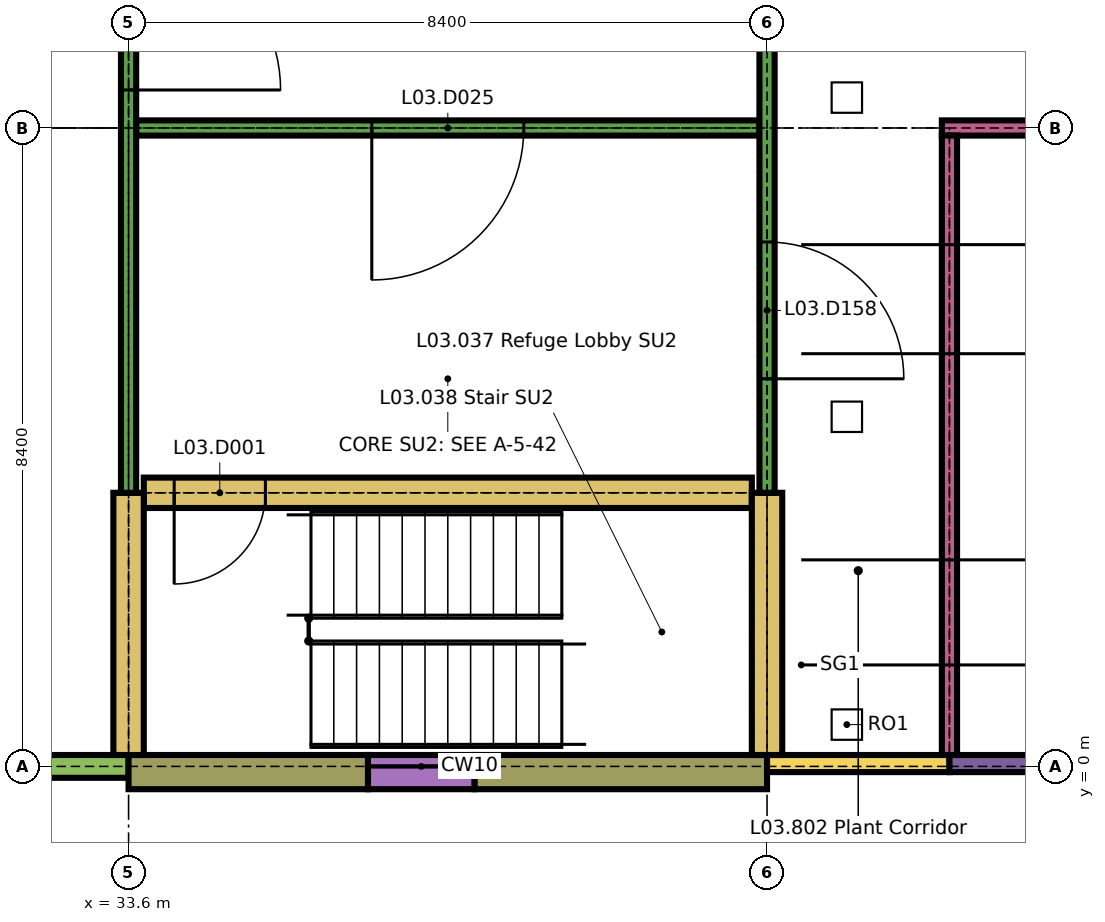
"""IFC4 building model, lengths in metres.
Left out: names, types, materials, properties, quantities, classifications, styles, units other than length and angle.
Written with IfcOpenShell. Run it as: python <this file> out.ifc"""

import sys

from ifc_helpers import new_model, si_unit, direction, frame, frame_2d, origin, place, context, subcontext, project, spatial, rectangle, extrude, element, fill, save


model = new_model("IFC4")
c1 = context("Model", 3, precision=1e-05, world=origin(), true_north=direction((0.0, 1.0)))
c2 = subcontext(c1, "Body", "Model", "MODEL_VIEW")
j1 = project(units=[si_unit("LENGTHUNIT", "METRE"), si_unit("PLANEANGLEUNIT", "RADIAN")], contexts=[c1])
p1 = place(None, origin())
s1 = spatial("IfcSite", under=j1, at=p1, CompositionType="ELEMENT")
p2 = place(p1, origin())
s2 = spatial("IfcBuilding", under=s1, at=p2, CompositionType="ELEMENT")
p3 = place(p2, frame((0.0, 0.0, 15.3)))
s3 = spatial("IfcBuildingStorey", under=s2, at=p3, CompositionType="ELEMENT", Elevation=15.3)
p4 = place(p3, frame((32.3, 0.0, 0.0), z_axis=(0.0, 0.0, 1.0), x_axis=(1.0, 0.0, 0.0)))
e1 = element("IfcWall", 1, at=p4, inside=s3, PredefinedType="SOLIDWALL", context=c2, shape_type="SweptSolid", body=[
    extrude(rectangle(XDim=1.3, YDim=0.3, at=frame_2d((0.65, 0.0))), origin(), (0.0, 0.0, 1.0), 2.96),
])
p5 = place(p3, frame((33.6, -0.075, 0.0), z_axis=(0.0, 0.0, 1.0), x_axis=(1.0, 0.0, 0.0)))
e2 = element("IfcWall", 2, at=p5, inside=s3, PredefinedType="SOLIDWALL", context=c2, shape_type="SweptSolid", body=[
    extrude(rectangle(XDim=3.15, YDim=0.45, at=frame_2d((1.575, 0.0))), origin(), (0.0, 0.0, 1.0), 3.26),
])
p6 = place(p3, frame((38.15, -0.075, 0.0), z_axis=(0.0, 0.0, 1.0), x_axis=(1.0, 0.0, 0.0)))
e3 = element("IfcWall", 3, at=p6, inside=s3, PredefinedType="SOLIDWALL", context=c2, shape_type="SweptSolid", body=[
    extrude(rectangle(XDim=3.85, YDim=0.45, at=frame_2d((1.925, 0.0))), origin(), (0.0, 0.0, 1.0), 3.26),
])
p7 = place(p3, frame((36.75, -0.075, 0.0), z_axis=(0.0, 0.0, 1.0), x_axis=(1.0, 0.0, 0.0)))
e4 = element("IfcWall", 4, at=p7, inside=s3, PredefinedType="SOLIDWALL", context=c2, shape_type="SweptSolid", body=[
    extrude(rectangle(XDim=1.4, YDim=0.45, at=frame_2d((0.7, 0.0))), origin(), (0.0, 0.0, 1.0), 0.6),
])
p8 = place(p3, frame((42.0, 0.038, 0.0), z_axis=(0.0, 0.0, 1.0), x_axis=(1.0, 0.0, 0.0)))
e5 = element("IfcWall", 5, at=p8, inside=s3, PredefinedType="SOLIDWALL", context=c2, shape_type="SweptSolid", body=[
    extrude(rectangle(XDim=2.4, YDim=0.225, at=frame_2d((1.2, 0.0))), origin(), (0.0, 0.0, 1.0), 3.26),
])
p9 = place(p3, frame((44.4, 0.038, 0.0), z_axis=(0.0, 0.0, 1.0), x_axis=(1.0, 0.0, 0.0)))
e6 = element("IfcWall", 6, at=p9, inside=s3, PredefinedType="SOLIDWALL", context=c2, shape_type="SweptSolid", body=[
    extrude(rectangle(XDim=5.625, YDim=0.225, at=frame_2d((2.812, 0.0))), origin(), (0.0, 0.0, 1.0), 4.0),
])
p10 = place(p9, frame((2.85, 0.0, 0.6)))
e7 = element("IfcOpeningElement", 7, at=p10, cuts=e6, PredefinedType="OPENING", context=c2, shape_type="SweptSolid", body=[
    extrude(rectangle(XDim=2.1, YDim=2.1, at=frame_2d((1.05, 1.05))), frame((0.0, 0.123, 0.0), z_axis=(0.0, -1.0, 0.0), x_axis=(1.0, 0.0, 0.0)), (0.0, 0.0, 1.0), 0.245),
])
p11 = place(p3, frame((42.21, 4.2, 4.904), z_axis=(0.0, 0.0, 1.0), x_axis=(1.0, 0.0, 0.0)))
e8 = element("IfcWall", 8, at=p11, inside=s3, PredefinedType="SOLIDWALL", context=c2, shape_type="SweptSolid", body=[
    extrude(rectangle(XDim=58.38, YDim=0.2, at=frame_2d((29.19, 0.0))), origin(), (0.0, 0.0, 1.0), 2.539),
])
p12 = place(p11, frame((1.05, 0.0, 0.3)))
e9 = element("IfcOpeningElement", 9, at=p12, cuts=e8, PredefinedType="OPENING", context=c2, shape_type="SweptSolid", body=[
    extrude(rectangle(XDim=2.1, YDim=1.8, at=frame_2d((1.05, 0.9))), frame((0.0, 0.11, 0.0), z_axis=(0.0, -1.0, 0.0), x_axis=(1.0, 0.0, 0.0)), (0.0, 0.0, 1.0), 0.22),
])
p13 = place(p11, frame((5.25, 0.0, 0.3)))
e10 = element("IfcOpeningElement", 10, at=p13, cuts=e8, PredefinedType="OPENING", context=c2, shape_type="SweptSolid", body=[
    extrude(rectangle(XDim=2.1, YDim=1.8, at=frame_2d((1.05, 0.9))), frame((0.0, 0.11, 0.0), z_axis=(0.0, -1.0, 0.0), x_axis=(1.0, 0.0, 0.0)), (0.0, 0.0, 1.0), 0.22),
])
p14 = place(p11, frame((9.45, 0.0, 0.3)))
e11 = element("IfcOpeningElement", 11, at=p14, cuts=e8, PredefinedType="OPENING", context=c2, shape_type="SweptSolid", body=[
    extrude(rectangle(XDim=2.1, YDim=1.8, at=frame_2d((1.05, 0.9))), frame((0.0, 0.11, 0.0), z_axis=(0.0, -1.0, 0.0), x_axis=(1.0, 0.0, 0.0)), (0.0, 0.0, 1.0), 0.22),
])
p15 = place(p11, frame((13.65, 0.0, 0.3)))
e12 = element("IfcOpeningElement", 12, at=p15, cuts=e8, PredefinedType="OPENING", context=c2, shape_type="SweptSolid", body=[
    extrude(rectangle(XDim=2.1, YDim=1.8, at=frame_2d((1.05, 0.9))), frame((0.0, 0.11, 0.0), z_axis=(0.0, -1.0, 0.0), x_axis=(1.0, 0.0, 0.0)), (0.0, 0.0, 1.0), 0.22),
])
p16 = place(p11, frame((17.85, 0.0, 0.3)))
e13 = element("IfcOpeningElement", 13, at=p16, cuts=e8, PredefinedType="OPENING", context=c2, shape_type="SweptSolid", body=[
    extrude(rectangle(XDim=2.1, YDim=1.8, at=frame_2d((1.05, 0.9))), frame((0.0, 0.11, 0.0), z_axis=(0.0, -1.0, 0.0), x_axis=(1.0, 0.0, 0.0)), (0.0, 0.0, 1.0), 0.22),
])
p17 = place(p11, frame((22.05, 0.0, 0.3)))
e14 = element("IfcOpeningElement", 14, at=p17, cuts=e8, PredefinedType="OPENING", context=c2, shape_type="SweptSolid", body=[
    extrude(rectangle(XDim=2.1, YDim=1.8, at=frame_2d((1.05, 0.9))), frame((0.0, 0.11, 0.0), z_axis=(0.0, -1.0, 0.0), x_axis=(1.0, 0.0, 0.0)), (0.0, 0.0, 1.0), 0.22),
])
p18 = place(p11, frame((26.25, 0.0, 0.3)))
e15 = element("IfcOpeningElement", 15, at=p18, cuts=e8, PredefinedType="OPENING", context=c2, shape_type="SweptSolid", body=[
    extrude(rectangle(XDim=2.1, YDim=1.8, at=frame_2d((1.05, 0.9))), frame((0.0, 0.11, 0.0), z_axis=(0.0, -1.0, 0.0), x_axis=(1.0, 0.0, 0.0)), (0.0, 0.0, 1.0), 0.22),
])
p19 = place(p11, frame((30.45, 0.0, 0.3)))
e16 = element("IfcOpeningElement", 16, at=p19, cuts=e8, PredefinedType="OPENING", context=c2, shape_type="SweptSolid", body=[
    extrude(rectangle(XDim=2.1, YDim=1.8, at=frame_2d((1.05, 0.9))), frame((0.0, 0.11, 0.0), z_axis=(0.0, -1.0, 0.0), x_axis=(1.0, 0.0, 0.0)), (0.0, 0.0, 1.0), 0.22),
])
p20 = place(p11, frame((34.65, 0.0, 0.3)))
e17 = element("IfcOpeningElement", 17, at=p20, cuts=e8, PredefinedType="OPENING", context=c2, shape_type="SweptSolid", body=[
    extrude(rectangle(XDim=2.1, YDim=1.8, at=frame_2d((1.05, 0.9))), frame((0.0, 0.11, 0.0), z_axis=(0.0, -1.0, 0.0), x_axis=(1.0, 0.0, 0.0)), (0.0, 0.0, 1.0), 0.22),
])
p21 = place(p11, frame((38.85, 0.0, 0.3)))
e18 = element("IfcOpeningElement", 18, at=p21, cuts=e8, PredefinedType="OPENING", context=c2, shape_type="SweptSolid", body=[
    extrude(rectangle(XDim=2.1, YDim=1.8, at=frame_2d((1.05, 0.9))), frame((0.0, 0.11, 0.0), z_axis=(0.0, -1.0, 0.0), x_axis=(1.0, 0.0, 0.0)), (0.0, 0.0, 1.0), 0.22),
])
p22 = place(p11, frame((43.05, 0.0, 0.3)))
e19 = element("IfcOpeningElement", 19, at=p22, cuts=e8, PredefinedType="OPENING", context=c2, shape_type="SweptSolid", body=[
    extrude(rectangle(XDim=2.1, YDim=1.8, at=frame_2d((1.05, 0.9))), frame((0.0, 0.11, 0.0), z_axis=(0.0, -1.0, 0.0), x_axis=(1.0, 0.0, 0.0)), (0.0, 0.0, 1.0), 0.22),
])
p23 = place(p11, frame((47.25, 0.0, 0.3)))
e20 = element("IfcOpeningElement", 20, at=p23, cuts=e8, PredefinedType="OPENING", context=c2, shape_type="SweptSolid", body=[
    extrude(rectangle(XDim=2.1, YDim=1.8, at=frame_2d((1.05, 0.9))), frame((0.0, 0.11, 0.0), z_axis=(0.0, -1.0, 0.0), x_axis=(1.0, 0.0, 0.0)), (0.0, 0.0, 1.0), 0.22),
])
p24 = place(p11, frame((51.45, 0.0, 0.3)))
e21 = element("IfcOpeningElement", 21, at=p24, cuts=e8, PredefinedType="OPENING", context=c2, shape_type="SweptSolid", body=[
    extrude(rectangle(XDim=2.1, YDim=1.8, at=frame_2d((1.05, 0.9))), frame((0.0, 0.11, 0.0), z_axis=(0.0, -1.0, 0.0), x_axis=(1.0, 0.0, 0.0)), (0.0, 0.0, 1.0), 0.22),
])
p25 = place(p11, frame((55.65, 0.0, 0.3)))
e22 = element("IfcOpeningElement", 22, at=p25, cuts=e8, PredefinedType="OPENING", context=c2, shape_type="SweptSolid", body=[
    extrude(rectangle(XDim=2.1, YDim=1.8, at=frame_2d((1.05, 0.9))), frame((0.0, 0.11, 0.0), z_axis=(0.0, -1.0, 0.0), x_axis=(1.0, 0.0, 0.0)), (0.0, 0.0, 1.0), 0.22),
])
p26 = place(p3, frame((42.21, 8.4, 4.904), z_axis=(0.0, 0.0, 1.0), x_axis=(1.0, 0.0, 0.0)))
e23 = element("IfcWall", 23, at=p26, inside=s3, PredefinedType="SOLIDWALL", context=c2, shape_type="SweptSolid", body=[
    extrude(rectangle(XDim=58.38, YDim=0.2, at=frame_2d((29.19, 0.0))), origin(), (0.0, 0.0, 1.0), 2.539),
])
p27 = place(p26, frame((1.05, 0.0, 0.3)))
e24 = element("IfcOpeningElement", 24, at=p27, cuts=e23, PredefinedType="OPENING", context=c2, shape_type="SweptSolid", body=[
    extrude(rectangle(XDim=2.1, YDim=1.8, at=frame_2d((1.05, 0.9))), frame((0.0, 0.11, 0.0), z_axis=(0.0, -1.0, 0.0), x_axis=(1.0, 0.0, 0.0)), (0.0, 0.0, 1.0), 0.22),
])
p28 = place(p26, frame((5.25, 0.0, 0.3)))
e25 = element("IfcOpeningElement", 25, at=p28, cuts=e23, PredefinedType="OPENING", context=c2, shape_type="SweptSolid", body=[
    extrude(rectangle(XDim=2.1, YDim=1.8, at=frame_2d((1.05, 0.9))), frame((0.0, 0.11, 0.0), z_axis=(0.0, -1.0, 0.0), x_axis=(1.0, 0.0, 0.0)), (0.0, 0.0, 1.0), 0.22),
])
p29 = place(p26, frame((9.45, 0.0, 0.3)))
e26 = element("IfcOpeningElement", 26, at=p29, cuts=e23, PredefinedType="OPENING", context=c2, shape_type="SweptSolid", body=[
    extrude(rectangle(XDim=2.1, YDim=1.8, at=frame_2d((1.05, 0.9))), frame((0.0, 0.11, 0.0), z_axis=(0.0, -1.0, 0.0), x_axis=(1.0, 0.0, 0.0)), (0.0, 0.0, 1.0), 0.22),
])
p30 = place(p26, frame((13.65, 0.0, 0.3)))
e27 = element("IfcOpeningElement", 27, at=p30, cuts=e23, PredefinedType="OPENING", context=c2, shape_type="SweptSolid", body=[
    extrude(rectangle(XDim=2.1, YDim=1.8, at=frame_2d((1.05, 0.9))), frame((0.0, 0.11, 0.0), z_axis=(0.0, -1.0, 0.0), x_axis=(1.0, 0.0, 0.0)), (0.0, 0.0, 1.0), 0.22),
])
p31 = place(p26, frame((17.85, 0.0, 0.3)))
e28 = element("IfcOpeningElement", 28, at=p31, cuts=e23, PredefinedType="OPENING", context=c2, shape_type="SweptSolid", body=[
    extrude(rectangle(XDim=2.1, YDim=1.8, at=frame_2d((1.05, 0.9))), frame((0.0, 0.11, 0.0), z_axis=(0.0, -1.0, 0.0), x_axis=(1.0, 0.0, 0.0)), (0.0, 0.0, 1.0), 0.22),
])
p32 = place(p26, frame((22.05, 0.0, 0.3)))
e29 = element("IfcOpeningElement", 29, at=p32, cuts=e23, PredefinedType="OPENING", context=c2, shape_type="SweptSolid", body=[
    extrude(rectangle(XDim=2.1, YDim=1.8, at=frame_2d((1.05, 0.9))), frame((0.0, 0.11, 0.0), z_axis=(0.0, -1.0, 0.0), x_axis=(1.0, 0.0, 0.0)), (0.0, 0.0, 1.0), 0.22),
])
p33 = place(p26, frame((26.25, 0.0, 0.3)))
e30 = element("IfcOpeningElement", 30, at=p33, cuts=e23, PredefinedType="OPENING", context=c2, shape_type="SweptSolid", body=[
    extrude(rectangle(XDim=2.1, YDim=1.8, at=frame_2d((1.05, 0.9))), frame((0.0, 0.11, 0.0), z_axis=(0.0, -1.0, 0.0), x_axis=(1.0, 0.0, 0.0)), (0.0, 0.0, 1.0), 0.22),
])
p34 = place(p26, frame((30.45, 0.0, 0.3)))
e31 = element("IfcOpeningElement", 31, at=p34, cuts=e23, PredefinedType="OPENING", context=c2, shape_type="SweptSolid", body=[
    extrude(rectangle(XDim=2.1, YDim=1.8, at=frame_2d((1.05, 0.9))), frame((0.0, 0.11, 0.0), z_axis=(0.0, -1.0, 0.0), x_axis=(1.0, 0.0, 0.0)), (0.0, 0.0, 1.0), 0.22),
])
p35 = place(p26, frame((34.65, 0.0, 0.3)))
e32 = element("IfcOpeningElement", 32, at=p35, cuts=e23, PredefinedType="OPENING", context=c2, shape_type="SweptSolid", body=[
    extrude(rectangle(XDim=2.1, YDim=1.8, at=frame_2d((1.05, 0.9))), frame((0.0, 0.11, 0.0), z_axis=(0.0, -1.0, 0.0), x_axis=(1.0, 0.0, 0.0)), (0.0, 0.0, 1.0), 0.22),
])
p36 = place(p26, frame((38.85, 0.0, 0.3)))
e33 = element("IfcOpeningElement", 33, at=p36, cuts=e23, PredefinedType="OPENING", context=c2, shape_type="SweptSolid", body=[
    extrude(rectangle(XDim=2.1, YDim=1.8, at=frame_2d((1.05, 0.9))), frame((0.0, 0.11, 0.0), z_axis=(0.0, -1.0, 0.0), x_axis=(1.0, 0.0, 0.0)), (0.0, 0.0, 1.0), 0.22),
])
p37 = place(p26, frame((43.05, 0.0, 0.3)))
e34 = element("IfcOpeningElement", 34, at=p37, cuts=e23, PredefinedType="OPENING", context=c2, shape_type="SweptSolid", body=[
    extrude(rectangle(XDim=2.1, YDim=1.8, at=frame_2d((1.05, 0.9))), frame((0.0, 0.11, 0.0), z_axis=(0.0, -1.0, 0.0), x_axis=(1.0, 0.0, 0.0)), (0.0, 0.0, 1.0), 0.22),
])
p38 = place(p26, frame((47.25, 0.0, 0.3)))
e35 = element("IfcOpeningElement", 35, at=p38, cuts=e23, PredefinedType="OPENING", context=c2, shape_type="SweptSolid", body=[
    extrude(rectangle(XDim=2.1, YDim=1.8, at=frame_2d((1.05, 0.9))), frame((0.0, 0.11, 0.0), z_axis=(0.0, -1.0, 0.0), x_axis=(1.0, 0.0, 0.0)), (0.0, 0.0, 1.0), 0.22),
])
p39 = place(p26, frame((51.45, 0.0, 0.3)))
e36 = element("IfcOpeningElement", 36, at=p39, cuts=e23, PredefinedType="OPENING", context=c2, shape_type="SweptSolid", body=[
    extrude(rectangle(XDim=2.1, YDim=1.8, at=frame_2d((1.05, 0.9))), frame((0.0, 0.11, 0.0), z_axis=(0.0, -1.0, 0.0), x_axis=(1.0, 0.0, 0.0)), (0.0, 0.0, 1.0), 0.22),
])
p40 = place(p26, frame((55.65, 0.0, 0.3)))
e37 = element("IfcOpeningElement", 37, at=p40, cuts=e23, PredefinedType="OPENING", context=c2, shape_type="SweptSolid", body=[
    extrude(rectangle(XDim=2.1, YDim=1.8, at=frame_2d((1.05, 0.9))), frame((0.0, 0.11, 0.0), z_axis=(0.0, -1.0, 0.0), x_axis=(1.0, 0.0, 0.0)), (0.0, 0.0, 1.0), 0.22),
])
p41 = place(p3, frame((33.8, 3.6, 0.0), z_axis=(0.0, 0.0, 1.0), x_axis=(1.0, 0.0, 0.0)))
e38 = element("IfcWall", 38, at=p41, inside=s3, PredefinedType="SHEAR", context=c2, shape_type="SweptSolid", body=[
    extrude(rectangle(XDim=8.0, YDim=0.4, at=frame_2d((4.0, 0.0))), origin(), (0.0, 0.0, 1.0), 3.26),
])
p42 = place(p41, frame((0.4, 0.0, 0.0)))
e39 = element("IfcOpeningElement", 39, at=p42, cuts=e38, PredefinedType="OPENING", context=c2, shape_type="SweptSolid", body=[
    extrude(rectangle(XDim=1.2, YDim=2.1, at=frame_2d((0.6, 1.05))), frame((0.0, 0.21, 0.0), z_axis=(0.0, -1.0, 0.0), x_axis=(1.0, 0.0, 0.0)), (0.0, 0.0, 1.0), 0.42),
])
p43 = place(p3, frame((33.7, 8.4, 0.0), z_axis=(0.0, 0.0, 1.0), x_axis=(1.0, 0.0, 0.0)))
e40 = element("IfcWall", 40, at=p43, inside=s3, PredefinedType="PARTITIONING", context=c2, shape_type="SweptSolid", body=[
    extrude(rectangle(XDim=8.2, YDim=0.2, at=frame_2d((4.1, 0.0))), origin(), (0.0, 0.0, 1.0), 3.26),
])
p44 = place(p43, frame((3.1, 0.0, 0.0)))
e41 = element("IfcOpeningElement", 41, at=p44, cuts=e40, PredefinedType="OPENING", context=c2, shape_type="SweptSolid", body=[
    extrude(rectangle(XDim=2.0, YDim=2.4, at=frame_2d((1.0, 1.2))), frame((0.0, 0.11, 0.0), z_axis=(0.0, -1.0, 0.0), x_axis=(1.0, 0.0, 0.0)), (0.0, 0.0, 1.0), 0.22),
])
p45 = place(p3, frame((44.3, 8.4, 0.0), z_axis=(0.0, 0.0, 1.0), x_axis=(1.0, 0.0, 0.0)))
e42 = element("IfcWall", 42, at=p45, inside=s3, PredefinedType="PARTITIONING", context=c2, shape_type="SweptSolid", body=[
    extrude(rectangle(XDim=5.725, YDim=0.2, at=frame_2d((2.862, 0.0))), origin(), (0.0, 0.0, 1.0), 4.0),
])
p46 = place(p45, frame((2.113, 0.0, 0.0)))
e43 = element("IfcOpeningElement", 43, at=p46, cuts=e42, PredefinedType="OPENING", context=c2, shape_type="SweptSolid", body=[
    extrude(rectangle(XDim=1.4, YDim=2.1, at=frame_2d((0.7, 1.05))), frame((0.0, 0.11, 0.0), z_axis=(0.0, -1.0, 0.0), x_axis=(1.0, 0.0, 0.0)), (0.0, 0.0, 1.0), 0.22),
])
p47 = place(p3, frame((33.6, 0.15, 0.0), z_axis=(0.0, 0.0, 1.0), x_axis=(0.0, 1.0, 0.0)))
e44 = element("IfcWall", 44, at=p47, inside=s3, PredefinedType="SHEAR", context=c2, shape_type="SweptSolid", body=[
    extrude(rectangle(XDim=3.45, YDim=0.4, at=frame_2d((1.725, 0.0))), origin(), (0.0, 0.0, 1.0), 3.26),
])
p48 = place(p3, frame((33.6, 3.6, 0.0), z_axis=(0.0, 0.0, 1.0), x_axis=(0.0, 1.0, 0.0)))
e45 = element("IfcWall", 45, at=p48, inside=s3, PredefinedType="PARTITIONING", context=c2, shape_type="SweptSolid", body=[
    extrude(rectangle(XDim=12.85, YDim=0.2, at=frame_2d((6.425, 0.0))), origin(), (0.0, 0.0, 1.0), 3.26),
])
p49 = place(p48, frame((5.3, 0.0, 0.0)))
e46 = element("IfcOpeningElement", 46, at=p49, cuts=e45, PredefinedType="OPENING", context=c2, shape_type="SweptSolid", body=[
    extrude(rectangle(XDim=2.0, YDim=2.4, at=frame_2d((1.0, 1.2))), frame((0.0, 0.11, 0.0), z_axis=(0.0, -1.0, 0.0), x_axis=(1.0, 0.0, 0.0)), (0.0, 0.0, 1.0), 0.22),
])
p50 = place(p48, frame((10.525, 0.0, 0.0)))
e47 = element("IfcOpeningElement", 47, at=p50, cuts=e45, PredefinedType="OPENING", context=c2, shape_type="SweptSolid", body=[
    extrude(rectangle(XDim=2.0, YDim=2.4, at=frame_2d((1.0, 1.2))), frame((0.0, 0.11, 0.0), z_axis=(0.0, -1.0, 0.0), x_axis=(1.0, 0.0, 0.0)), (0.0, 0.0, 1.0), 0.22),
])
p51 = place(p3, frame((42.0, 0.15, 0.0), z_axis=(0.0, 0.0, 1.0), x_axis=(0.0, 1.0, 0.0)))
e48 = element("IfcWall", 48, at=p51, inside=s3, PredefinedType="SHEAR", context=c2, shape_type="SweptSolid", body=[
    extrude(rectangle(XDim=3.45, YDim=0.4, at=frame_2d((1.725, 0.0))), origin(), (0.0, 0.0, 1.0), 3.26),
])
p52 = place(p3, frame((42.0, 3.6, 0.0), z_axis=(0.0, 0.0, 1.0), x_axis=(0.0, 1.0, 0.0)))
e49 = element("IfcWall", 49, at=p52, inside=s3, PredefinedType="PARTITIONING", context=c2, shape_type="SweptSolid", body=[
    extrude(rectangle(XDim=12.825, YDim=0.2, at=frame_2d((6.413, 0.0))), origin(), (0.0, 0.0, 1.0), 3.26),
])
p53 = place(p52, frame((1.5, 0.0, 0.0)))
e50 = element("IfcOpeningElement", 50, at=p53, cuts=e49, PredefinedType="OPENING", context=c2, shape_type="SweptSolid", body=[
    extrude(rectangle(XDim=1.8, YDim=2.4, at=frame_2d((0.9, 1.2))), frame((0.0, 0.11, 0.0), z_axis=(0.0, -1.0, 0.0), x_axis=(1.0, 0.0, 0.0)), (0.0, 0.0, 1.0), 0.22),
])
p54 = place(p3, frame((44.4, 0.15, 0.0), z_axis=(0.0, 0.0, 1.0), x_axis=(0.0, 1.0, 0.0)))
e51 = element("IfcWall", 51, at=p54, inside=s3, PredefinedType="PARTITIONING", context=c2, shape_type="SweptSolid", body=[
    extrude(rectangle(XDim=8.15, YDim=0.2, at=frame_2d((4.075, 0.0))), origin(), (0.0, 0.0, 1.0), 4.0),
])
p55 = place(p12, origin())
e52 = element("IfcWindow", 52, at=p55, inside=s3, PartitioningType="SINGLE_PANEL", PredefinedType="WINDOW", context=c2, shape_type="SweptSolid", body=[
    extrude(rectangle(XDim=2.1, YDim=1.8, at=frame_2d((1.05, 0.9))), frame((0.0, 0.075, 0.0), z_axis=(0.0, -1.0, 0.0), x_axis=(1.0, 0.0, 0.0)), (0.0, 0.0, 1.0), 0.15),
])
fill(e9, e52)
p56 = place(p27, origin())
e53 = element("IfcWindow", 53, at=p56, inside=s3, PartitioningType="SINGLE_PANEL", PredefinedType="WINDOW", context=c2, shape_type="SweptSolid", body=[
    extrude(rectangle(XDim=2.1, YDim=1.8, at=frame_2d((1.05, 0.9))), frame((0.0, 0.075, 0.0), z_axis=(0.0, -1.0, 0.0), x_axis=(1.0, 0.0, 0.0)), (0.0, 0.0, 1.0), 0.15),
])
fill(e24, e53)
p57 = place(p42, origin())
e54 = element("IfcDoor", 54, at=p57, inside=s3, OperationType="SINGLE_SWING_LEFT", PredefinedType="DOOR", context=c2, shape_type="SweptSolid", body=[
    extrude(rectangle(XDim=1.2, YDim=2.1, at=frame_2d((0.6, 1.05))), frame((0.0, 0.025, 0.0), z_axis=(0.0, -1.0, 0.0), x_axis=(1.0, 0.0, 0.0)), (0.0, 0.0, 1.0), 0.05),
])
fill(e39, e54)
p58 = place(p44, origin())
e55 = element("IfcDoor", 55, at=p58, inside=s3, OperationType="SINGLE_SWING_LEFT", PredefinedType="DOOR", context=c2, shape_type="SweptSolid", body=[
    extrude(rectangle(XDim=2.0, YDim=2.4, at=frame_2d((1.0, 1.2))), frame((0.0, 0.03, 0.0), z_axis=(0.0, -1.0, 0.0), x_axis=(1.0, 0.0, 0.0)), (0.0, 0.0, 1.0), 0.06),
])
fill(e41, e55)
p59 = place(p49, origin())
e56 = element("IfcDoor", 56, at=p59, inside=s3, OperationType="SINGLE_SWING_LEFT", PredefinedType="DOOR", context=c2, shape_type="SweptSolid", body=[
    extrude(rectangle(XDim=2.0, YDim=2.4, at=frame_2d((1.0, 1.2))), frame((0.0, 0.03, 0.0), z_axis=(0.0, -1.0, 0.0), x_axis=(1.0, 0.0, 0.0)), (0.0, 0.0, 1.0), 0.06),
])
fill(e46, e56)
p60 = place(p53, origin())
e57 = element("IfcDoor", 57, at=p60, inside=s3, OperationType="SINGLE_SWING_LEFT", PredefinedType="DOOR", context=c2, shape_type="SweptSolid", body=[
    extrude(rectangle(XDim=1.8, YDim=2.4, at=frame_2d((0.9, 1.2))), frame((0.0, 0.03, 0.0), z_axis=(0.0, -1.0, 0.0), x_axis=(1.0, 0.0, 0.0)), (0.0, 0.0, 1.0), 0.06),
])
fill(e50, e57)
save(model, sys.argv[1])
